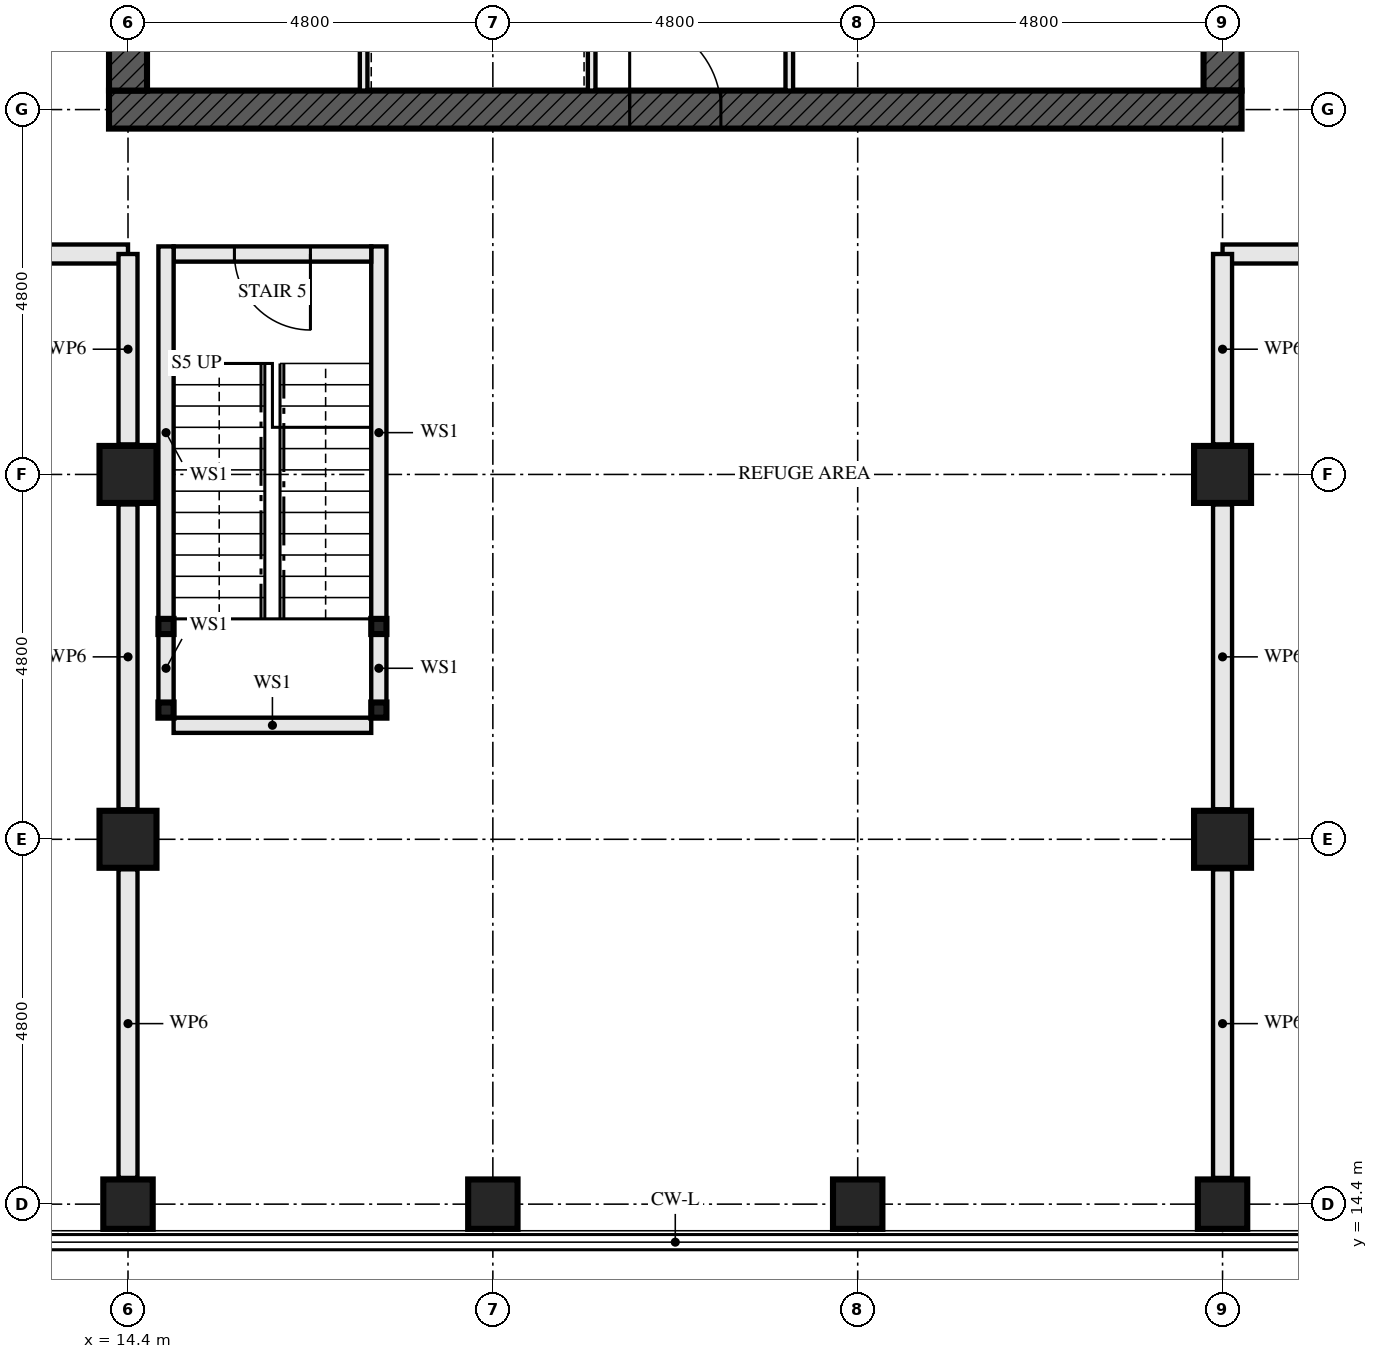
"""IFC4 building model, lengths in metres.
Left out: names, types, materials, properties, quantities, classifications, styles, units other than length and angle.
Written with IfcOpenShell. Run it as: python <this file> out.ifc"""

import sys

from ifc_helpers import new_model, si_unit, direction, frame, frame_2d, origin, origin_2d, place, context, subcontext, project, spatial, rectangle, hollow_rectangle, extrude, element, fill, save


model = new_model("IFC4")
c1 = context("Model", 3, precision=1e-05, world=origin(), true_north=direction((0.0, 1.0)))
c2 = subcontext(c1, "Body", "Model", "MODEL_VIEW")
j1 = project(units=[si_unit("LENGTHUNIT", "METRE"), si_unit("PLANEANGLEUNIT", "RADIAN")], contexts=[c1])
p1 = place(None, origin())
s1 = spatial("IfcSite", under=j1, at=p1, CompositionType="ELEMENT")
p2 = place(p1, origin())
s2 = spatial("IfcBuilding", under=s1, at=p2, CompositionType="ELEMENT")
p3 = place(p2, frame((0.0, 0.0, 79.5)))
s3 = spatial("IfcBuildingStorey", under=s2, at=p3, CompositionType="ELEMENT", Elevation=79.5)
p4 = place(p3, frame((14.4, 14.4, 0.0), z_axis=(0.0, 0.0, 1.0), x_axis=(0.0, 1.0, 0.0)))
e1 = element("IfcColumn", 1, at=p4, inside=s3, PredefinedType="COLUMN", context=c2, shape_type="SweptSolid", body=[
    extrude(hollow_rectangle(XDim=0.65, YDim=0.65, WallThickness=0.08, at=origin_2d()), origin(), (0.0, 0.0, 1.0), 4.33),
])
for number, where, z_axis, x_axis in (
    (2, (14.4, 19.2, 0.0), (0.0, 0.0, 1.0), (1.0, 0.0, 0.0)),
    (3, (14.4, 24.0, 0.0), (0.0, 0.0, 1.0), (1.0, 0.0, 0.0)),
):
    element("IfcColumn", number, at=place(p3, frame(where, z_axis=z_axis, x_axis=x_axis)), inside=s3, PredefinedType="COLUMN", context=c2, shape_type="SweptSolid", body=[
        extrude(hollow_rectangle(XDim=0.75, YDim=0.75, WallThickness=0.08, at=origin_2d()), origin(), (0.0, 0.0, 1.0), 4.5),
    ])
for number, where, z_axis, x_axis in (
    (4, (19.2, 14.4, 0.0), (0.0, 0.0, 1.0), (0.0, 1.0, 0.0)),
    (5, (24.0, 14.4, 0.0), (0.0, 0.0, 1.0), (0.0, 1.0, 0.0)),
    (6, (28.8, 14.4, 0.0), (0.0, 0.0, 1.0), (0.0, 1.0, 0.0)),
):
    element("IfcColumn", number, at=place(p3, frame(where, z_axis=z_axis, x_axis=x_axis)), inside=s3, PredefinedType="COLUMN", context=c2, shape_type="SweptSolid", body=[
        extrude(hollow_rectangle(XDim=0.65, YDim=0.65, WallThickness=0.08, at=origin_2d()), origin(), (0.0, 0.0, 1.0), 4.5),
    ])
for number, where, z_axis, x_axis in (
    (7, (28.8, 19.2, 0.0), (0.0, 0.0, 1.0), (1.0, 0.0, 0.0)),
    (8, (28.8, 24.0, 0.0), (0.0, 0.0, 1.0), (1.0, 0.0, 0.0)),
):
    element("IfcColumn", number, at=place(p3, frame(where, z_axis=z_axis, x_axis=x_axis)), inside=s3, PredefinedType="COLUMN", context=c2, shape_type="SweptSolid", body=[
        extrude(hollow_rectangle(XDim=0.75, YDim=0.75, WallThickness=0.08, at=origin_2d()), origin(), (0.0, 0.0, 1.0), 4.5),
    ])
p5 = place(p3, frame((14.15, 28.8, -0.25), z_axis=(0.0, 0.0, 1.0), x_axis=(1.0, 0.0, 0.0)))
e9 = element("IfcWall", 9, at=p5, inside=s3, PredefinedType="SHEAR", context=c2, shape_type="SweptSolid", body=[
    extrude(rectangle(XDim=14.9, YDim=0.5, at=frame_2d((7.45, 0.0))), origin(), (0.0, 0.0, 1.0), 4.58),
])
p6 = place(p5, frame((6.85, 0.0, 0.25)))
e10 = element("IfcOpeningElement", 10, at=p6, cuts=e9, PredefinedType="OPENING", context=c2, shape_type="SweptSolid", body=[
    extrude(rectangle(XDim=1.2, YDim=2.1, at=frame_2d((0.6, 1.05))), frame((0.0, 0.26, 0.0), z_axis=(0.0, -1.0, 0.0), x_axis=(1.0, 0.0, 0.0)), (0.0, 0.0, 1.0), 0.521),
])
p7 = place(p3, frame((14.4, 42.95, -0.25), z_axis=(0.0, 0.0, 1.0), x_axis=(0.0, -1.0, 0.0)))
e11 = element("IfcWall", 11, at=p7, inside=s3, PredefinedType="SHEAR", context=c2, shape_type="SweptSolid", body=[
    extrude(rectangle(XDim=13.9, YDim=0.5, at=frame_2d((6.95, 0.0))), origin(), (0.0, 0.0, 1.0), 4.58),
])
p8 = place(p7, frame((6.35, 0.0, 0.25)))
e12 = element("IfcOpeningElement", 12, at=p8, cuts=e11, PredefinedType="OPENING", context=c2, shape_type="SweptSolid", body=[
    extrude(rectangle(XDim=1.2, YDim=2.1, at=frame_2d((0.6, 1.05))), frame((0.0, 0.26, 0.0), z_axis=(0.0, -1.0, 0.0), x_axis=(1.0, 0.0, 0.0)), (0.0, 0.0, 1.0), 0.521),
])
p9 = place(p3, frame((28.8, 29.05, -0.25), z_axis=(0.0, 0.0, 1.0), x_axis=(0.0, 1.0, 0.0)))
e13 = element("IfcWall", 13, at=p9, inside=s3, PredefinedType="SHEAR", context=c2, shape_type="SweptSolid", body=[
    extrude(rectangle(XDim=13.9, YDim=0.5, at=frame_2d((6.95, 0.0))), origin(), (0.0, 0.0, 1.0), 4.58),
])
p10 = place(p9, frame((6.35, 0.0, 0.25)))
e14 = element("IfcOpeningElement", 14, at=p10, cuts=e13, PredefinedType="OPENING", context=c2, shape_type="SweptSolid", body=[
    extrude(rectangle(XDim=1.2, YDim=2.1, at=frame_2d((0.6, 1.05))), frame((0.0, 0.26, 0.0), z_axis=(0.0, -1.0, 0.0), x_axis=(1.0, 0.0, 0.0)), (0.0, 0.0, 1.0), 0.521),
])
for number, where, z_axis, x_axis in (
    (15, (14.9, 20.9, 0.0), (0.0, 0.0, 1.0), (1.0, 0.0, 0.0)),
    (16, (17.7, 20.9, 0.0), (0.0, 0.0, 1.0), (1.0, 0.0, 0.0)),
    (17, (14.9, 22.0, 0.0), (0.0, 0.0, 1.0), (1.0, 0.0, 0.0)),
    (18, (17.7, 22.0, 0.0), (0.0, 0.0, 1.0), (1.0, 0.0, 0.0)),
):
    element("IfcColumn", number, at=place(p3, frame(where, z_axis=z_axis, x_axis=x_axis)), inside=s3, PredefinedType="COLUMN", context=c2, shape_type="SweptSolid", body=[
        extrude(hollow_rectangle(XDim=0.2, YDim=0.2, WallThickness=0.008, at=origin_2d()), origin(), (0.0, 0.0, 1.0), 4.33),
    ])
p11 = place(p3, frame((4.8, 26.9, 0.0), z_axis=(0.0, 0.0, 1.0), x_axis=(1.0, 0.0, 0.0)))
e19 = element("IfcWall", 19, at=p11, inside=s3, PredefinedType="SOLIDWALL", context=c2, shape_type="SweptSolid", body=[
    extrude(rectangle(XDim=9.6, YDim=0.25, at=frame_2d((4.8, 0.0))), origin(), (0.0, 0.0, 1.0), 4.33),
])
p12 = place(p11, frame((3.9, 0.0, 0.0)))
e20 = element("IfcOpeningElement", 20, at=p12, cuts=e19, PredefinedType="OPENING", context=c2, shape_type="SweptSolid", body=[
    extrude(rectangle(XDim=1.8, YDim=2.4, at=frame_2d((0.9, 1.2))), frame((0.0, 0.135, 0.0), z_axis=(0.0, -1.0, 0.0), x_axis=(1.0, 0.0, 0.0)), (0.0, 0.0, 1.0), 0.271),
])
p13 = place(p3, frame((14.9, 21.0, 0.0), z_axis=(0.0, 0.0, 1.0), x_axis=(0.0, 1.0, 0.0)))
e21 = element("IfcWall", 21, at=p13, inside=s3, PredefinedType="SOLIDWALL", context=c2, shape_type="SweptSolid", body=[
    extrude(rectangle(XDim=0.9, YDim=0.2, at=frame_2d((0.45, 0.0))), origin(), (0.0, 0.0, 1.0), 3.99),
])
p14 = place(p3, frame((14.9, 22.1, 0.0), z_axis=(0.0, 0.0, 1.0), x_axis=(0.0, 1.0, 0.0)))
e22 = element("IfcWall", 22, at=p14, inside=s3, PredefinedType="SOLIDWALL", context=c2, shape_type="SweptSolid", body=[
    extrude(rectangle(XDim=4.9, YDim=0.2, at=frame_2d((2.45, 0.0))), origin(), (0.0, 0.0, 1.0), 3.99),
])
p15 = place(p3, frame((17.7, 21.0, 0.0), z_axis=(0.0, 0.0, 1.0), x_axis=(0.0, 1.0, 0.0)))
e23 = element("IfcWall", 23, at=p15, inside=s3, PredefinedType="SOLIDWALL", context=c2, shape_type="SweptSolid", body=[
    extrude(rectangle(XDim=0.9, YDim=0.2, at=frame_2d((0.45, 0.0))), origin(), (0.0, 0.0, 1.0), 3.99),
])
p16 = place(p3, frame((17.7, 22.1, 0.0), z_axis=(0.0, 0.0, 1.0), x_axis=(0.0, 1.0, 0.0)))
e24 = element("IfcWall", 24, at=p16, inside=s3, PredefinedType="SOLIDWALL", context=c2, shape_type="SweptSolid", body=[
    extrude(rectangle(XDim=4.9, YDim=0.2, at=frame_2d((2.45, 0.0))), origin(), (0.0, 0.0, 1.0), 3.99),
])
p17 = place(p3, frame((15.0, 20.7, 0.0), z_axis=(0.0, 0.0, 1.0), x_axis=(1.0, 0.0, 0.0)))
e25 = element("IfcWall", 25, at=p17, inside=s3, PredefinedType="SOLIDWALL", context=c2, shape_type="SweptSolid", body=[
    extrude(rectangle(XDim=2.6, YDim=0.2, at=frame_2d((1.3, 0.0))), origin(), (0.0, 0.0, 1.0), 4.33),
])
p18 = place(p3, frame((15.0, 26.9, 0.0), z_axis=(0.0, 0.0, 1.0), x_axis=(1.0, 0.0, 0.0)))
e26 = element("IfcWall", 26, at=p18, inside=s3, PredefinedType="SOLIDWALL", context=c2, shape_type="SweptSolid", body=[
    extrude(rectangle(XDim=2.6, YDim=0.2, at=frame_2d((1.3, 0.0))), origin(), (0.0, 0.0, 1.0), 4.33),
])
p19 = place(p18, frame((0.8, 0.0, 0.0)))
e27 = element("IfcOpeningElement", 27, at=p19, cuts=e26, PredefinedType="OPENING", context=c2, shape_type="SweptSolid", body=[
    extrude(rectangle(XDim=1.0, YDim=2.1, at=frame_2d((0.5, 1.05))), frame((0.0, 0.111, 0.0), z_axis=(0.0, -1.0, 0.0), x_axis=(1.0, 0.0, 0.0)), (0.0, 0.0, 1.0), 0.221),
])
p20 = place(p3, frame((28.8, 26.9, 0.0), z_axis=(0.0, 0.0, 1.0), x_axis=(1.0, 0.0, 0.0)))
e28 = element("IfcWall", 28, at=p20, inside=s3, PredefinedType="SOLIDWALL", context=c2, shape_type="SweptSolid", body=[
    extrude(rectangle(XDim=9.6, YDim=0.25, at=frame_2d((4.8, 0.0))), origin(), (0.0, 0.0, 1.0), 4.33),
])
p21 = place(p20, frame((3.9, 0.0, 0.0)))
e29 = element("IfcOpeningElement", 29, at=p21, cuts=e28, PredefinedType="OPENING", context=c2, shape_type="SweptSolid", body=[
    extrude(rectangle(XDim=1.8, YDim=2.4, at=frame_2d((0.9, 1.2))), frame((0.0, 0.135, 0.0), z_axis=(0.0, -1.0, 0.0), x_axis=(1.0, 0.0, 0.0)), (0.0, 0.0, 1.0), 0.271),
])
p22 = place(p3, frame((20.5, 29.05, 0.0), z_axis=(0.0, 0.0, 1.0), x_axis=(0.0, 1.0, 0.0)))
e30 = element("IfcWall", 30, at=p22, inside=s3, PredefinedType="SOLIDWALL", context=c2, shape_type="SweptSolid", body=[
    extrude(rectangle(XDim=5.8, YDim=0.1, at=frame_2d((2.9, 0.0))), origin(), (0.0, 0.0, 1.0), 4.33),
])
p23 = place(p22, frame((0.8, 0.0, 0.0)))
e31 = element("IfcOpeningElement", 31, at=p23, cuts=e30, PredefinedType="OPENING", context=c2, shape_type="SweptSolid", body=[
    extrude(rectangle(XDim=1.1, YDim=2.3, at=frame_2d((0.55, 1.15))), frame((0.0, 0.061, 0.0), z_axis=(0.0, -1.0, 0.0), x_axis=(1.0, 0.0, 0.0)), (0.0, 0.0, 1.0), 0.121),
])
p24 = place(p22, frame((3.775, 0.0, 0.0)))
e32 = element("IfcOpeningElement", 32, at=p24, cuts=e30, PredefinedType="OPENING", context=c2, shape_type="SweptSolid", body=[
    extrude(rectangle(XDim=1.1, YDim=2.3, at=frame_2d((0.55, 1.15))), frame((0.0, 0.061, 0.0), z_axis=(0.0, -1.0, 0.0), x_axis=(1.0, 0.0, 0.0)), (0.0, 0.0, 1.0), 0.121),
])
p25 = place(p3, frame((23.1, 29.05, 0.0), z_axis=(0.0, 0.0, 1.0), x_axis=(0.0, 1.0, 0.0)))
e33 = element("IfcWall", 33, at=p25, inside=s3, PredefinedType="SOLIDWALL", context=c2, shape_type="SweptSolid", body=[
    extrude(rectangle(XDim=5.8, YDim=0.1, at=frame_2d((2.9, 0.0))), origin(), (0.0, 0.0, 1.0), 4.33),
])
p26 = place(p25, frame((1.0, 0.0, 0.0)))
e34 = element("IfcOpeningElement", 34, at=p26, cuts=e33, PredefinedType="OPENING", context=c2, shape_type="SweptSolid", body=[
    extrude(rectangle(XDim=0.7, YDim=2.1, at=frame_2d((0.35, 1.05))), frame((0.0, 0.061, 0.0), z_axis=(0.0, -1.0, 0.0), x_axis=(1.0, 0.0, 0.0)), (0.0, 0.0, 1.0), 0.121),
])
p27 = place(p3, frame((17.5, 29.05, 0.0), z_axis=(0.0, 0.0, 1.0), x_axis=(0.0, 1.0, 0.0)))
e35 = element("IfcWall", 35, at=p27, inside=s3, PredefinedType="SOLIDWALL", context=c2, shape_type="SweptSolid", body=[
    extrude(rectangle(XDim=5.8, YDim=0.1, at=frame_2d((2.9, 0.0))), origin(), (0.0, 0.0, 1.0), 4.33),
])
p28 = place(p3, frame((14.4, 14.745, 0.0), z_axis=(0.0, 0.0, 1.0), x_axis=(0.0, 1.0, 0.0)))
e36 = element("IfcWall", 36, at=p28, inside=s3, PredefinedType="SOLIDWALL", context=c2, shape_type="SweptSolid", body=[
    extrude(rectangle(XDim=4.06, YDim=0.25, at=frame_2d((2.03, 0.0))), origin(), (0.0, 0.0, 1.0), 2.82),
])
p29 = place(p3, frame((14.4, 19.595, 0.0), z_axis=(0.0, 0.0, 1.0), x_axis=(0.0, 1.0, 0.0)))
e37 = element("IfcWall", 37, at=p29, inside=s3, PredefinedType="SOLIDWALL", context=c2, shape_type="SweptSolid", body=[
    extrude(rectangle(XDim=4.01, YDim=0.25, at=frame_2d((2.005, 0.0))), origin(), (0.0, 0.0, 1.0), 2.82),
])
p30 = place(p3, frame((14.4, 24.395, 0.0), z_axis=(0.0, 0.0, 1.0), x_axis=(0.0, 1.0, 0.0)))
e38 = element("IfcWall", 38, at=p30, inside=s3, PredefinedType="SOLIDWALL", context=c2, shape_type="SweptSolid", body=[
    extrude(rectangle(XDim=2.505, YDim=0.25, at=frame_2d((1.252, 0.0))), origin(), (0.0, 0.0, 1.0), 2.82),
])
p31 = place(p3, frame((28.8, 14.745, 0.0), z_axis=(0.0, 0.0, 1.0), x_axis=(0.0, 1.0, 0.0)))
e39 = element("IfcWall", 39, at=p31, inside=s3, PredefinedType="SOLIDWALL", context=c2, shape_type="SweptSolid", body=[
    extrude(rectangle(XDim=4.06, YDim=0.25, at=frame_2d((2.03, 0.0))), origin(), (0.0, 0.0, 1.0), 2.82),
])
p32 = place(p3, frame((28.8, 19.595, 0.0), z_axis=(0.0, 0.0, 1.0), x_axis=(0.0, 1.0, 0.0)))
e40 = element("IfcWall", 40, at=p32, inside=s3, PredefinedType="SOLIDWALL", context=c2, shape_type="SweptSolid", body=[
    extrude(rectangle(XDim=4.01, YDim=0.25, at=frame_2d((2.005, 0.0))), origin(), (0.0, 0.0, 1.0), 2.82),
])
p33 = place(p3, frame((28.8, 24.395, 0.0), z_axis=(0.0, 0.0, 1.0), x_axis=(0.0, 1.0, 0.0)))
e41 = element("IfcWall", 41, at=p33, inside=s3, PredefinedType="SOLIDWALL", context=c2, shape_type="SweptSolid", body=[
    extrude(rectangle(XDim=2.505, YDim=0.25, at=frame_2d((1.252, 0.0))), origin(), (0.0, 0.0, 1.0), 2.82),
])
p34 = place(p19, frame((1.0, 0.0, 0.0), z_axis=(0.0, 0.0, 1.0), x_axis=(-1.0, 0.0, 0.0)))
e42 = element("IfcDoor", 42, at=p34, inside=s3, OperationType="SINGLE_SWING_RIGHT", PredefinedType="DOOR", context=c2, shape_type="SweptSolid", body=[
    extrude(rectangle(XDim=1.0, YDim=2.1, at=frame_2d((0.5, 1.05))), frame((0.0, 0.032, 0.0), z_axis=(0.0, -1.0, 0.0), x_axis=(1.0, 0.0, 0.0)), (0.0, 0.0, 1.0), 0.064),
])
fill(e27, e42)
p35 = place(p6, origin())
e43 = element("IfcDoor", 43, at=p35, inside=s3, OperationType="SINGLE_SWING_LEFT", PredefinedType="DOOR", context=c2, shape_type="SweptSolid", body=[
    extrude(rectangle(XDim=1.2, YDim=2.1, at=frame_2d((0.6, 1.05))), frame((0.0, 0.027, 0.0), z_axis=(0.0, -1.0, 0.0), x_axis=(1.0, 0.0, 0.0)), (0.0, 0.0, 1.0), 0.054),
])
fill(e10, e43)
save(model, sys.argv[1])
